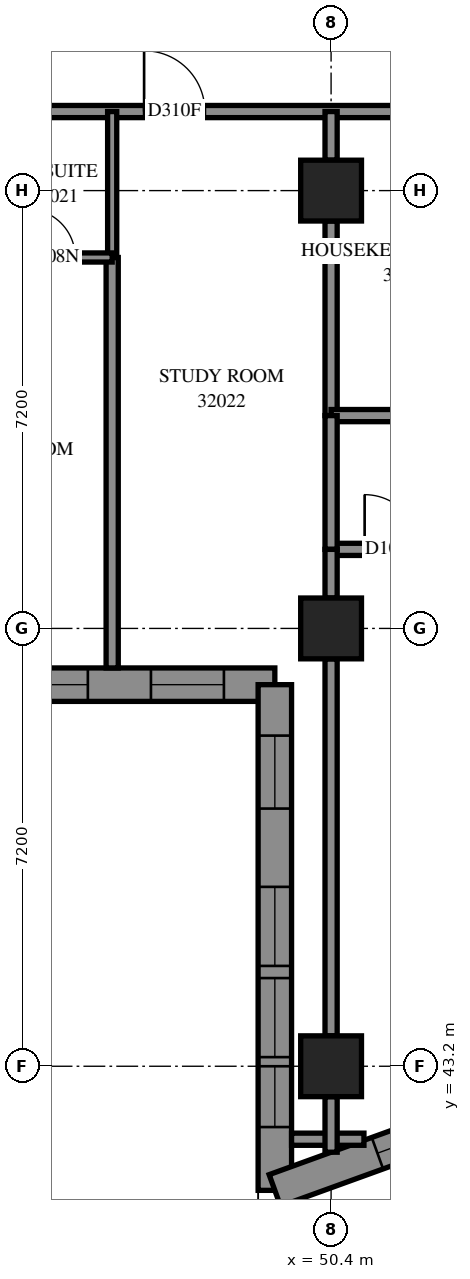
"""IFC4 building model, lengths in metres.
Left out: names, types, materials, properties, quantities, classifications, styles, units other than length and angle.
Written with IfcOpenShell. Run it as: python <this file> out.ifc"""

import sys

from ifc_helpers import new_model, si_unit, direction, frame, frame_2d, origin, origin_2d, place, context, subcontext, project, spatial, polyline, rectangle, outline, extrude, element, fill, save


model = new_model("IFC4")
c1 = context("Model", 3, precision=1e-05, world=origin(), true_north=direction((0.0, 1.0)))
c2 = subcontext(c1, "Body", "Model", "MODEL_VIEW")
j1 = project(units=[si_unit("LENGTHUNIT", "METRE"), si_unit("PLANEANGLEUNIT", "RADIAN")], contexts=[c1])
p1 = place(None, origin())
s1 = spatial("IfcSite", under=j1, at=p1, CompositionType="ELEMENT")
p2 = place(p1, origin())
s2 = spatial("IfcBuilding", under=s1, at=p2, CompositionType="ELEMENT")
p3 = place(p2, frame((0.0, 0.0, 118.6)))
s3 = spatial("IfcBuildingStorey", under=s2, at=p3, CompositionType="ELEMENT", Elevation=118.6)
for number, where, z_axis, x_axis in (
    (1, (50.4, 43.2, 0.0), (0.0, 0.0, 1.0), (1.0, 0.0, 0.0)),
    (2, (50.4, 50.4, 0.0), (0.0, 0.0, 1.0), (1.0, 0.0, 0.0)),
    (3, (50.4, 57.6, 0.0), (0.0, 0.0, 1.0), (1.0, 0.0, 0.0)),
):
    element("IfcColumn", number, at=place(p3, frame(where, z_axis=z_axis, x_axis=x_axis)), inside=s3, PredefinedType="COLUMN", context=c2, shape_type="SweptSolid", body=[
        extrude(rectangle(XDim=1.0, YDim=1.0, at=origin_2d()), origin(), (0.0, 0.0, 1.0), 3.1),
    ])
p4 = place(p3, frame((42.275, 49.475, 0.0), z_axis=(0.0, 0.0, 1.0), x_axis=(1.0, 0.0, 0.0)))
e4 = element("IfcWall", 4, at=p4, inside=s3, PredefinedType="SOLIDWALL", context=c2, shape_type="SweptSolid", body=[
    extrude(outline(polyline([(-0.275, -0.275), (6.925, -0.275), (7.475, 0.275), (0.275, 0.275), (-0.275, -0.275)])), origin(), (0.0, 0.0, 1.0), 3.1),
])
p5 = place(p4, frame((1.325, 0.0, 0.5)))
e5 = element("IfcOpeningElement", 5, at=p5, cuts=e4, PredefinedType="OPENING", context=c2, shape_type="SweptSolid", body=[
    extrude(rectangle(XDim=1.3, YDim=2.45, at=frame_2d((0.65, 1.225))), frame((0.0, 0.285, 0.0), z_axis=(0.0, -1.0, 0.0), x_axis=(1.0, 0.0, 0.0)), (0.0, 0.0, 1.0), 0.57),
])
p6 = place(p4, frame((2.825, 0.0, 0.5)))
e6 = element("IfcOpeningElement", 6, at=p6, cuts=e4, PredefinedType="OPENING", context=c2, shape_type="SweptSolid", body=[
    extrude(rectangle(XDim=1.3, YDim=2.45, at=frame_2d((0.65, 1.225))), frame((0.0, 0.285, 0.0), z_axis=(0.0, -1.0, 0.0), x_axis=(1.0, 0.0, 0.0)), (0.0, 0.0, 1.0), 0.57),
])
p7 = place(p4, frame((5.162, 0.0, 0.5)))
e7 = element("IfcOpeningElement", 7, at=p7, cuts=e4, PredefinedType="OPENING", context=c2, shape_type="SweptSolid", body=[
    extrude(rectangle(XDim=1.2, YDim=2.45, at=frame_2d((0.6, 1.225))), frame((0.0, 0.285, 0.0), z_axis=(0.0, -1.0, 0.0), x_axis=(1.0, 0.0, 0.0)), (0.0, 0.0, 1.0), 0.57),
])
p8 = place(p3, frame((49.475, 49.475, 0.0), z_axis=(0.0, 0.0, 1.0), x_axis=(0.0, -1.0, 0.0)))
e8 = element("IfcWall", 8, at=p8, inside=s3, PredefinedType="SOLIDWALL", context=c2, shape_type="SweptSolid", body=[
    extrude(outline(polyline([(0.275, -0.275), (8.708, -0.275), (7.924, 0.275), (-0.275, 0.275), (0.275, -0.275)])), origin(), (0.0, 0.0, 1.0), 3.1),
])
p9 = place(p8, frame((3.325, 0.0, 0.5)))
e9 = element("IfcOpeningElement", 9, at=p9, cuts=e8, PredefinedType="OPENING", context=c2, shape_type="SweptSolid", body=[
    extrude(rectangle(XDim=1.3, YDim=2.45, at=frame_2d((0.65, 1.225))), frame((0.0, 0.285, 0.0), z_axis=(0.0, -1.0, 0.0), x_axis=(1.0, 0.0, 0.0)), (0.0, 0.0, 1.0), 0.57),
])
p10 = place(p8, frame((4.825, 0.0, 0.5)))
e10 = element("IfcOpeningElement", 10, at=p10, cuts=e8, PredefinedType="OPENING", context=c2, shape_type="SweptSolid", body=[
    extrude(rectangle(XDim=1.3, YDim=2.45, at=frame_2d((0.65, 1.225))), frame((0.0, 0.285, 0.0), z_axis=(0.0, -1.0, 0.0), x_axis=(1.0, 0.0, 0.0)), (0.0, 0.0, 1.0), 0.57),
])
p11 = place(p8, frame((0.838, 0.0, 0.5)))
e11 = element("IfcOpeningElement", 11, at=p11, cuts=e8, PredefinedType="OPENING", context=c2, shape_type="SweptSolid", body=[
    extrude(rectangle(XDim=1.2, YDim=2.45, at=frame_2d((0.6, 1.225))), frame((0.0, 0.285, 0.0), z_axis=(0.0, -1.0, 0.0), x_axis=(1.0, 0.0, 0.0)), (0.0, 0.0, 1.0), 0.57),
])
p12 = place(p8, frame((6.275, 0.0, 0.45)))
e12 = element("IfcOpeningElement", 12, at=p12, cuts=e8, PredefinedType="OPENING", context=c2, shape_type="SweptSolid", body=[
    extrude(rectangle(XDim=1.0, YDim=2.5, at=frame_2d((0.5, 1.25))), frame((0.0, 0.285, 0.0), z_axis=(0.0, -1.0, 0.0), x_axis=(1.0, 0.0, 0.0)), (0.0, 0.0, 1.0), 0.57),
])
p13 = place(p3, frame((49.475, 41.159, 0.0), z_axis=(0.0, 0.0, 1.0), x_axis=(0.9402923967, 0.3403677552, 0.0)))
e13 = element("IfcWall", 13, at=p13, inside=s3, PredefinedType="SOLIDWALL", context=c2, shape_type="SweptSolid", body=[
    extrude(outline(polyline([(-0.392, -0.275), (3.231, -0.275), (3.38, 0.275), (0.392, 0.275), (-0.392, -0.275)])), origin(), (0.0, 0.0, 1.0), 3.1),
])
p14 = place(p13, frame((1.794, 0.0, 0.5)))
e14 = element("IfcOpeningElement", 14, at=p14, cuts=e13, PredefinedType="OPENING", context=c2, shape_type="SweptSolid", body=[
    extrude(rectangle(XDim=1.2, YDim=2.45, at=frame_2d((0.6, 1.225))), frame((0.0, 0.285, 0.0), z_axis=(0.0, -1.0, 0.0), x_axis=(1.0, 0.0, 0.0)), (0.0, 0.0, 1.0), 0.57),
])
p15 = place(p3, frame((28.802, 58.9, 0.0), z_axis=(0.0, 0.0, 1.0), x_axis=(1.0, 0.0, 0.0)))
e15 = element("IfcWall", 15, at=p15, inside=s3, PredefinedType="PARTITIONING", context=c2, shape_type="SweptSolid", body=[
    extrude(rectangle(XDim=24.098, YDim=0.2, at=frame_2d((12.049, 0.0))), origin(), (0.0, 0.0, 1.0), 3.1),
])
p16 = place(p15, frame((11.323, 0.0, 0.0)))
e16 = element("IfcOpeningElement", 16, at=p16, cuts=e15, PredefinedType="OPENING", context=c2, shape_type="SweptSolid", body=[
    extrude(rectangle(XDim=1.0, YDim=2.1, at=frame_2d((0.5, 1.05))), frame((0.0, 0.11, 0.0), z_axis=(0.0, -1.0, 0.0), x_axis=(1.0, 0.0, 0.0)), (0.0, 0.0, 1.0), 0.22),
])
p17 = place(p15, frame((14.908, 0.0, 0.0)))
e17 = element("IfcOpeningElement", 17, at=p17, cuts=e15, PredefinedType="OPENING", context=c2, shape_type="SweptSolid", body=[
    extrude(rectangle(XDim=0.9, YDim=2.1, at=frame_2d((0.45, 1.05))), frame((0.0, 0.11, 0.0), z_axis=(0.0, -1.0, 0.0), x_axis=(1.0, 0.0, 0.0)), (0.0, 0.0, 1.0), 0.22),
])
p18 = place(p15, frame((18.523, 0.0, 0.0)))
e18 = element("IfcOpeningElement", 18, at=p18, cuts=e15, PredefinedType="OPENING", context=c2, shape_type="SweptSolid", body=[
    extrude(rectangle(XDim=1.0, YDim=2.1, at=frame_2d((0.5, 1.05))), frame((0.0, 0.11, 0.0), z_axis=(0.0, -1.0, 0.0), x_axis=(1.0, 0.0, 0.0)), (0.0, 0.0, 1.0), 0.22),
])
p19 = place(p15, frame((22.845, 0.0, 0.0)))
e19 = element("IfcOpeningElement", 19, at=p19, cuts=e15, PredefinedType="OPENING", context=c2, shape_type="SweptSolid", body=[
    extrude(rectangle(XDim=1.0, YDim=2.1, at=frame_2d((0.5, 1.05))), frame((0.0, 0.11, 0.0), z_axis=(0.0, -1.0, 0.0), x_axis=(1.0, 0.0, 0.0)), (0.0, 0.0, 1.0), 0.22),
])
p20 = place(p3, frame((46.8, 49.75, 0.0), z_axis=(0.0, 0.0, 1.0), x_axis=(0.0, 1.0, 0.0)))
e20 = element("IfcWall", 20, at=p20, inside=s3, PredefinedType="PARTITIONING", context=c2, shape_type="SweptSolid", body=[
    extrude(rectangle(XDim=6.75, YDim=0.2, at=frame_2d((3.375, 0.0))), origin(), (0.0, 0.0, 1.0), 3.1),
])
p21 = place(p3, frame((50.4, 43.7, 0.0), z_axis=(0.0, 0.0, 1.0), x_axis=(0.0, 1.0, 0.0)))
e21 = element("IfcWall", 21, at=p21, inside=s3, PredefinedType="PARTITIONING", context=c2, shape_type="SweptSolid", body=[
    extrude(rectangle(XDim=6.2, YDim=0.2, at=frame_2d((3.1, 0.0))), origin(), (0.0, 0.0, 1.0), 2.6),
])
p22 = place(p3, frame((50.4, 51.7, 0.0), z_axis=(0.0, 0.0, 1.0), x_axis=(1.0, 0.0, 0.0)))
e22 = element("IfcWall", 22, at=p22, inside=s3, PredefinedType="PARTITIONING", context=c2, shape_type="SweptSolid", body=[
    extrude(rectangle(XDim=4.3, YDim=0.2, at=frame_2d((2.15, 0.0))), origin(), (0.0, 0.0, 1.0), 3.1),
])
p23 = place(p22, frame((0.552, 0.0, 0.0)))
e23 = element("IfcOpeningElement", 23, at=p23, cuts=e22, PredefinedType="OPENING", context=c2, shape_type="SweptSolid", body=[
    extrude(rectangle(XDim=0.9, YDim=2.1, at=frame_2d((0.45, 1.05))), frame((0.0, 0.11, 0.0), z_axis=(0.0, -1.0, 0.0), x_axis=(1.0, 0.0, 0.0)), (0.0, 0.0, 1.0), 0.22),
])
p24 = place(p3, frame((50.4, 53.9, 0.0), z_axis=(0.0, 0.0, 1.0), x_axis=(0.0, 1.0, 0.0)))
e24 = element("IfcWall", 24, at=p24, inside=s3, PredefinedType="PARTITIONING", context=c2, shape_type="SweptSolid", body=[
    extrude(rectangle(XDim=3.2, YDim=0.2, at=frame_2d((1.6, 0.0))), origin(), (0.0, 0.0, 1.0), 3.1),
])
p25 = place(p3, frame((50.4, 53.9, 0.0), z_axis=(0.0, 0.0, 1.0), x_axis=(1.0, 0.0, 0.0)))
e25 = element("IfcWall", 25, at=p25, inside=s3, PredefinedType="PARTITIONING", context=c2, shape_type="SweptSolid", body=[
    extrude(rectangle(XDim=2.5, YDim=0.2, at=frame_2d((1.25, 0.0))), origin(), (0.0, 0.0, 1.0), 3.1),
])
p26 = place(p3, frame((46.8, 56.5, 0.0), z_axis=(0.0, 0.0, 1.0), x_axis=(0.0, 1.0, 0.0)))
e26 = element("IfcWall", 26, at=p26, inside=s3, PredefinedType="PARTITIONING", context=c2, shape_type="SweptSolid", body=[
    extrude(rectangle(XDim=2.4, YDim=0.15, at=frame_2d((1.2, 0.0))), origin(), (0.0, 0.0, 1.0), 3.1),
])
p27 = place(p3, frame((50.4, 51.7, 0.0), z_axis=(0.0, 0.0, 1.0), x_axis=(0.0, 1.0, 0.0)))
e27 = element("IfcWall", 27, at=p27, inside=s3, PredefinedType="PARTITIONING", context=c2, shape_type="SweptSolid", body=[
    extrude(rectangle(XDim=2.2, YDim=0.2, at=frame_2d((1.1, 0.0))), origin(), (0.0, 0.0, 1.0), 3.1),
])
p28 = place(p3, frame((44.9, 56.5, 0.0), z_axis=(0.0, 0.0, 1.0), x_axis=(1.0, 0.0, 0.0)))
e28 = element("IfcWall", 28, at=p28, inside=s3, PredefinedType="PARTITIONING", context=c2, shape_type="SweptSolid", body=[
    extrude(rectangle(XDim=1.9, YDim=0.15, at=frame_2d((0.95, 0.0))), origin(), (0.0, 0.0, 1.0), 3.1),
])
p29 = place(p28, frame((0.493, 0.0, 0.0)))
e29 = element("IfcOpeningElement", 29, at=p29, cuts=e28, PredefinedType="OPENING", context=c2, shape_type="SweptSolid", body=[
    extrude(rectangle(XDim=0.8, YDim=2.1, at=frame_2d((0.4, 1.05))), frame((0.0, 0.085, 0.0), z_axis=(0.0, -1.0, 0.0), x_axis=(1.0, 0.0, 0.0)), (0.0, 0.0, 1.0), 0.17),
])
p30 = place(p3, frame((49.75, 42.0, 0.0), z_axis=(0.0, 0.0, 1.0), x_axis=(1.0, 0.0, 0.0)))
e30 = element("IfcWall", 30, at=p30, inside=s3, PredefinedType="PARTITIONING", context=c2, shape_type="SweptSolid", body=[
    extrude(rectangle(XDim=1.19, YDim=0.2, at=frame_2d((0.595, 0.0))), origin(), (0.0, 0.0, 1.0), 3.1),
])
for number, where, z_axis, x_axis in (
    (31, (50.4, 50.9, 0.0), (0.0, 0.0, 1.0), (0.0, 1.0, 0.0)),
    (32, (50.4, 58.1, 0.0), (0.0, 0.0, 1.0), (0.0, 1.0, 0.0)),
):
    element("IfcWall", number, at=place(p3, frame(where, z_axis=z_axis, x_axis=x_axis)), inside=s3, PredefinedType="PARTITIONING", context=c2, shape_type="SweptSolid", body=[
        extrude(rectangle(XDim=0.8, YDim=0.2, at=frame_2d((0.4, 0.0))), origin(), (0.0, 0.0, 1.0), 3.1),
    ])
p31 = place(p3, frame((50.4, 41.786, 0.0), z_axis=(0.0, 0.0, 1.0), x_axis=(0.0, 1.0, 0.0)))
e33 = element("IfcWall", 33, at=p31, inside=s3, PredefinedType="PARTITIONING", context=c2, shape_type="SweptSolid", body=[
    extrude(rectangle(XDim=0.914, YDim=0.2, at=frame_2d((0.457, 0.0))), origin(), (0.0, 0.0, 1.0), 3.1),
])
p32 = place(p6, origin())
e34 = element("IfcWindow", 34, at=p32, inside=s3, PartitioningType="SINGLE_PANEL", PredefinedType="WINDOW", context=c2, shape_type="SweptSolid", body=[
    extrude(rectangle(XDim=1.3, YDim=2.45, at=frame_2d((0.65, 1.225))), frame((0.0, 0.155, 0.0), z_axis=(0.0, -1.0, 0.0), x_axis=(1.0, 0.0, 0.0)), (0.0, 0.0, 1.0), 0.06),
])
fill(e6, e34)
p33 = place(p7, origin())
e35 = element("IfcWindow", 35, at=p33, inside=s3, PartitioningType="SINGLE_PANEL", PredefinedType="WINDOW", context=c2, shape_type="SweptSolid", body=[
    extrude(rectangle(XDim=1.2, YDim=2.45, at=frame_2d((0.6, 1.225))), frame((0.0, 0.155, 0.0), z_axis=(0.0, -1.0, 0.0), x_axis=(1.0, 0.0, 0.0)), (0.0, 0.0, 1.0), 0.06),
])
fill(e7, e35)
p34 = place(p9, origin())
e36 = element("IfcWindow", 36, at=p34, inside=s3, PartitioningType="SINGLE_PANEL", PredefinedType="WINDOW", context=c2, shape_type="SweptSolid", body=[
    extrude(rectangle(XDim=1.3, YDim=2.45, at=frame_2d((0.65, 1.225))), frame((0.0, 0.155, 0.0), z_axis=(0.0, -1.0, 0.0), x_axis=(1.0, 0.0, 0.0)), (0.0, 0.0, 1.0), 0.06),
])
fill(e9, e36)
p35 = place(p10, origin())
e37 = element("IfcWindow", 37, at=p35, inside=s3, PartitioningType="SINGLE_PANEL", PredefinedType="WINDOW", context=c2, shape_type="SweptSolid", body=[
    extrude(rectangle(XDim=1.3, YDim=2.45, at=frame_2d((0.65, 1.225))), frame((0.0, 0.155, 0.0), z_axis=(0.0, -1.0, 0.0), x_axis=(1.0, 0.0, 0.0)), (0.0, 0.0, 1.0), 0.06),
])
fill(e10, e37)
p36 = place(p11, origin())
e38 = element("IfcWindow", 38, at=p36, inside=s3, PartitioningType="SINGLE_PANEL", PredefinedType="WINDOW", context=c2, shape_type="SweptSolid", body=[
    extrude(rectangle(XDim=1.2, YDim=2.45, at=frame_2d((0.6, 1.225))), frame((0.0, 0.155, 0.0), z_axis=(0.0, -1.0, 0.0), x_axis=(1.0, 0.0, 0.0)), (0.0, 0.0, 1.0), 0.06),
])
fill(e11, e38)
p37 = place(p14, origin())
e39 = element("IfcWindow", 39, at=p37, inside=s3, PartitioningType="SINGLE_PANEL", PredefinedType="WINDOW", context=c2, shape_type="SweptSolid", body=[
    extrude(rectangle(XDim=1.2, YDim=2.45, at=frame_2d((0.6, 1.225))), frame((0.0, 0.155, 0.0), z_axis=(0.0, -1.0, 0.0), x_axis=(1.0, 0.0, 0.0)), (0.0, 0.0, 1.0), 0.06),
])
fill(e14, e39)
p38 = place(p29, origin())
e40 = element("IfcDoor", 40, at=p38, inside=s3, OperationType="SINGLE_SWING_RIGHT", PredefinedType="DOOR", context=c2, shape_type="SweptSolid", body=[
    extrude(rectangle(XDim=0.8, YDim=2.1, at=frame_2d((0.4, 1.05))), frame((0.0, 0.025, 0.0), z_axis=(0.0, -1.0, 0.0), x_axis=(1.0, 0.0, 0.0)), (0.0, 0.0, 1.0), 0.05),
])
fill(e29, e40)
p39 = place(p18, origin())
e41 = element("IfcDoor", 41, at=p39, inside=s3, OperationType="SINGLE_SWING_RIGHT", PredefinedType="DOOR", context=c2, shape_type="SweptSolid", body=[
    extrude(rectangle(XDim=1.0, YDim=2.1, at=frame_2d((0.5, 1.05))), frame((0.0, 0.025, 0.0), z_axis=(0.0, -1.0, 0.0), x_axis=(1.0, 0.0, 0.0)), (0.0, 0.0, 1.0), 0.05),
])
fill(e18, e41)
p40 = place(p23, origin())
e42 = element("IfcDoor", 42, at=p40, inside=s3, OperationType="SINGLE_SWING_LEFT", PredefinedType="DOOR", context=c2, shape_type="SweptSolid", body=[
    extrude(rectangle(XDim=0.9, YDim=2.1, at=frame_2d((0.45, 1.05))), frame((0.0, 0.025, 0.0), z_axis=(0.0, -1.0, 0.0), x_axis=(1.0, 0.0, 0.0)), (0.0, 0.0, 1.0), 0.05),
])
fill(e23, e42)
p41 = place(p12, origin())
e43 = element("IfcWindow", 43, at=p41, inside=s3, PartitioningType="SINGLE_PANEL", PredefinedType="WINDOW", context=c2, shape_type="SweptSolid", body=[
    extrude(rectangle(XDim=1.0, YDim=2.5, at=frame_2d((0.5, 1.25))), frame((0.0, 0.155, 0.0), z_axis=(0.0, -1.0, 0.0), x_axis=(1.0, 0.0, 0.0)), (0.0, 0.0, 1.0), 0.06),
])
fill(e12, e43)
save(model, sys.argv[1])
